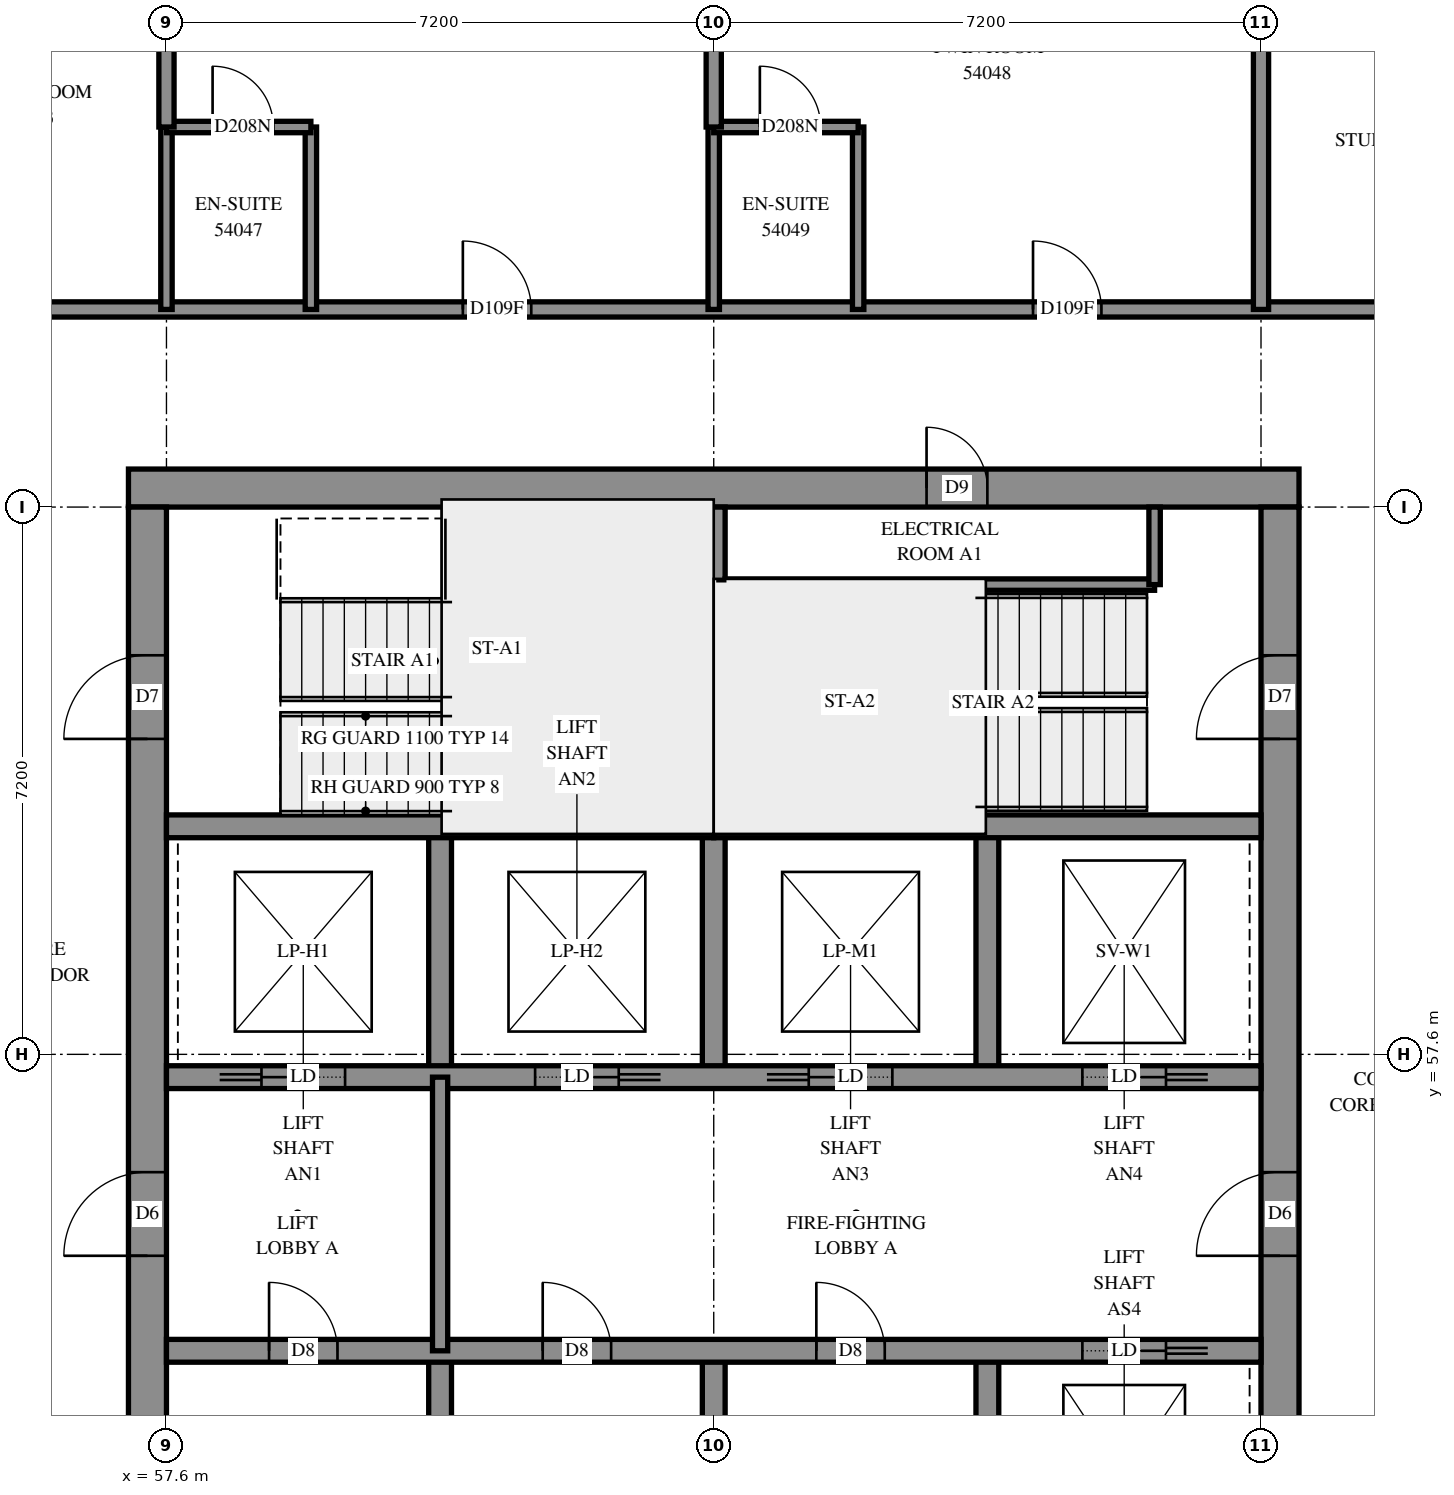
"""IFC4 building model, lengths in metres.
Left out: names, types, materials, properties, quantities, classifications, styles, units other than length and angle.
Written with IfcOpenShell. Run it as: python <this file> out.ifc"""

import sys

from ifc_helpers import new_model, si_unit, direction, frame, frame_2d, origin, place, context, subcontext, project, spatial, rectangle, extrude, element, fill, save


model = new_model("IFC4")
c1 = context("Model", 3, precision=1e-05, world=origin(), true_north=direction((0.0, 1.0)))
c2 = subcontext(c1, "Body", "Model", "MODEL_VIEW")
j1 = project(units=[si_unit("LENGTHUNIT", "METRE"), si_unit("PLANEANGLEUNIT", "RADIAN")], contexts=[c1])
p1 = place(None, origin())
s1 = spatial("IfcSite", under=j1, at=p1, CompositionType="ELEMENT")
p2 = place(p1, origin())
s2 = spatial("IfcBuilding", under=s1, at=p2, CompositionType="ELEMENT")
p3 = place(p2, frame((0.0, 0.0, 199.8)))
s3 = spatial("IfcBuildingStorey", under=s2, at=p3, CompositionType="ELEMENT", Elevation=199.8)
p4 = place(p3, frame((57.1, 65.05, -0.3), z_axis=(0.0, 0.0, 1.0), x_axis=(1.0, 0.0, 0.0)))
e1 = element("IfcWall", 1, at=p4, inside=s3, PredefinedType="SHEAR", context=c2, shape_type="SweptSolid", body=[
    extrude(rectangle(XDim=15.4, YDim=0.5, at=frame_2d((7.7, 0.0))), origin(), (0.0, 0.0, 1.0), 2.7),
])
p5 = place(p4, frame((10.5, 0.0, 0.3)))
e2 = element("IfcOpeningElement", 2, at=p5, cuts=e1, PredefinedType="OPENING", context=c2, shape_type="SweptSolid", body=[
    extrude(rectangle(XDim=0.8, YDim=2.1, at=frame_2d((0.4, 1.05))), frame((0.0, 0.26, 0.0), z_axis=(0.0, -1.0, 0.0), x_axis=(1.0, 0.0, 0.0)), (0.0, 0.0, 1.0), 0.52),
])
p6 = place(p3, frame((57.35, 50.4, -0.3), z_axis=(0.0, 0.0, 1.0), x_axis=(0.0, 1.0, 0.0)))
e3 = element("IfcWall", 3, at=p6, inside=s3, PredefinedType="SHEAR", context=c2, shape_type="SweptSolid", body=[
    extrude(rectangle(XDim=14.4, YDim=0.5, at=frame_2d((7.2, 0.0))), origin(), (0.0, 0.0, 1.0), 2.7),
])
p7 = place(p6, frame((4.55, 0.0, 0.3)))
e4 = element("IfcOpeningElement", 4, at=p7, cuts=e3, PredefinedType="OPENING", context=c2, shape_type="SweptSolid", body=[
    extrude(rectangle(XDim=1.1, YDim=2.1, at=frame_2d((0.55, 1.05))), frame((0.0, 0.26, 0.0), z_axis=(0.0, -1.0, 0.0), x_axis=(1.0, 0.0, 0.0)), (0.0, 0.0, 1.0), 0.52),
])
p8 = place(p6, frame((11.35, 0.0, 0.3)))
e5 = element("IfcOpeningElement", 5, at=p8, cuts=e3, PredefinedType="OPENING", context=c2, shape_type="SweptSolid", body=[
    extrude(rectangle(XDim=1.1, YDim=2.1, at=frame_2d((0.55, 1.05))), frame((0.0, 0.26, 0.0), z_axis=(0.0, -1.0, 0.0), x_axis=(1.0, 0.0, 0.0)), (0.0, 0.0, 1.0), 0.52),
])
p9 = place(p3, frame((72.25, 50.4, -0.3), z_axis=(0.0, 0.0, 1.0), x_axis=(0.0, 1.0, 0.0)))
e6 = element("IfcWall", 6, at=p9, inside=s3, PredefinedType="SHEAR", context=c2, shape_type="SweptSolid", body=[
    extrude(rectangle(XDim=14.4, YDim=0.5, at=frame_2d((7.2, 0.0))), origin(), (0.0, 0.0, 1.0), 2.7),
])
p10 = place(p9, frame((4.55, 0.0, 0.3)))
e7 = element("IfcOpeningElement", 7, at=p10, cuts=e6, PredefinedType="OPENING", context=c2, shape_type="SweptSolid", body=[
    extrude(rectangle(XDim=1.1, YDim=2.1, at=frame_2d((0.55, 1.05))), frame((0.0, 0.26, 0.0), z_axis=(0.0, -1.0, 0.0), x_axis=(1.0, 0.0, 0.0)), (0.0, 0.0, 1.0), 0.52),
])
p11 = place(p9, frame((11.35, 0.0, 0.3)))
e8 = element("IfcOpeningElement", 8, at=p11, cuts=e6, PredefinedType="OPENING", context=c2, shape_type="SweptSolid", body=[
    extrude(rectangle(XDim=1.1, YDim=2.1, at=frame_2d((0.55, 1.05))), frame((0.0, 0.26, 0.0), z_axis=(0.0, -1.0, 0.0), x_axis=(1.0, 0.0, 0.0)), (0.0, 0.0, 1.0), 0.52),
])
for number, where, z_axis, x_axis in (
    (9, (61.2, 50.4, 0.0), (0.0, 0.0, 1.0), (0.0, 1.0, 0.0)),
    (10, (61.2, 57.3, 0.0), (0.0, 0.0, 1.0), (0.0, 1.0, 0.0)),
    (11, (64.8, 50.4, 0.0), (0.0, 0.0, 1.0), (0.0, 1.0, 0.0)),
    (12, (64.8, 57.3, 0.0), (0.0, 0.0, 1.0), (0.0, 1.0, 0.0)),
    (13, (68.4, 50.4, 0.0), (0.0, 0.0, 1.0), (0.0, 1.0, 0.0)),
    (14, (68.4, 57.3, 0.0), (0.0, 0.0, 1.0), (0.0, 1.0, 0.0)),
):
    element("IfcWall", number, at=place(p3, frame(where, z_axis=z_axis, x_axis=x_axis)), inside=s3, PredefinedType="SOLIDWALL", context=c2, shape_type="SweptSolid", body=[
        extrude(rectangle(XDim=3.3, YDim=0.3, at=frame_2d((1.65, 0.0))), origin(), (0.0, 0.0, 1.0), 3.1),
    ])
p12 = place(p3, frame((57.6, 53.7, 0.0), z_axis=(0.0, 0.0, 1.0), x_axis=(1.0, 0.0, 0.0)))
e15 = element("IfcWall", 15, at=p12, inside=s3, PredefinedType="SOLIDWALL", context=c2, shape_type="SweptSolid", body=[
    extrude(rectangle(XDim=14.4, YDim=0.3, at=frame_2d((7.2, 0.0))), origin(), (0.0, 0.0, 1.0), 3.1),
])
p13 = place(p12, frame((1.35, 0.0, 0.0)))
e16 = element("IfcOpeningElement", 16, at=p13, cuts=e15, PredefinedType="OPENING", context=c2, shape_type="SweptSolid", body=[
    extrude(rectangle(XDim=0.9, YDim=2.1, at=frame_2d((0.45, 1.05))), frame((0.0, 0.16, 0.0), z_axis=(0.0, -1.0, 0.0), x_axis=(1.0, 0.0, 0.0)), (0.0, 0.0, 1.0), 0.32),
])
p14 = place(p12, frame((4.95, 0.0, 0.0)))
e17 = element("IfcOpeningElement", 17, at=p14, cuts=e15, PredefinedType="OPENING", context=c2, shape_type="SweptSolid", body=[
    extrude(rectangle(XDim=0.9, YDim=2.1, at=frame_2d((0.45, 1.05))), frame((0.0, 0.16, 0.0), z_axis=(0.0, -1.0, 0.0), x_axis=(1.0, 0.0, 0.0)), (0.0, 0.0, 1.0), 0.32),
])
p15 = place(p12, frame((8.55, 0.0, 0.0)))
e18 = element("IfcOpeningElement", 18, at=p15, cuts=e15, PredefinedType="OPENING", context=c2, shape_type="SweptSolid", body=[
    extrude(rectangle(XDim=0.9, YDim=2.1, at=frame_2d((0.45, 1.05))), frame((0.0, 0.16, 0.0), z_axis=(0.0, -1.0, 0.0), x_axis=(1.0, 0.0, 0.0)), (0.0, 0.0, 1.0), 0.32),
])
p16 = place(p12, frame((12.05, 0.0, 0.0)))
e19 = element("IfcOpeningElement", 19, at=p16, cuts=e15, PredefinedType="OPENING", context=c2, shape_type="SweptSolid", body=[
    extrude(rectangle(XDim=1.1, YDim=2.1, at=frame_2d((0.55, 1.05))), frame((0.0, 0.16, 0.0), z_axis=(0.0, -1.0, 0.0), x_axis=(1.0, 0.0, 0.0)), (0.0, 0.0, 1.0), 0.32),
])
p17 = place(p3, frame((57.6, 57.3, 0.0), z_axis=(0.0, 0.0, 1.0), x_axis=(1.0, 0.0, 0.0)))
e20 = element("IfcWall", 20, at=p17, inside=s3, PredefinedType="SOLIDWALL", context=c2, shape_type="SweptSolid", body=[
    extrude(rectangle(XDim=14.4, YDim=0.3, at=frame_2d((7.2, 0.0))), origin(), (0.0, 0.0, 1.0), 3.1),
])
p18 = place(p17, frame((1.25, 0.0, 0.0)))
e21 = element("IfcOpeningElement", 21, at=p18, cuts=e20, PredefinedType="OPENING", context=c2, shape_type="SweptSolid", body=[
    extrude(rectangle(XDim=1.1, YDim=2.1, at=frame_2d((0.55, 1.05))), frame((0.0, 0.16, 0.0), z_axis=(0.0, -1.0, 0.0), x_axis=(1.0, 0.0, 0.0)), (0.0, 0.0, 1.0), 0.32),
])
p19 = place(p17, frame((4.85, 0.0, 0.0)))
e22 = element("IfcOpeningElement", 22, at=p19, cuts=e20, PredefinedType="OPENING", context=c2, shape_type="SweptSolid", body=[
    extrude(rectangle(XDim=1.1, YDim=2.1, at=frame_2d((0.55, 1.05))), frame((0.0, 0.16, 0.0), z_axis=(0.0, -1.0, 0.0), x_axis=(1.0, 0.0, 0.0)), (0.0, 0.0, 1.0), 0.32),
])
p20 = place(p17, frame((8.45, 0.0, 0.0)))
e23 = element("IfcOpeningElement", 23, at=p20, cuts=e20, PredefinedType="OPENING", context=c2, shape_type="SweptSolid", body=[
    extrude(rectangle(XDim=1.1, YDim=2.1, at=frame_2d((0.55, 1.05))), frame((0.0, 0.16, 0.0), z_axis=(0.0, -1.0, 0.0), x_axis=(1.0, 0.0, 0.0)), (0.0, 0.0, 1.0), 0.32),
])
p21 = place(p17, frame((12.05, 0.0, 0.0)))
e24 = element("IfcOpeningElement", 24, at=p21, cuts=e20, PredefinedType="OPENING", context=c2, shape_type="SweptSolid", body=[
    extrude(rectangle(XDim=1.1, YDim=2.1, at=frame_2d((0.55, 1.05))), frame((0.0, 0.16, 0.0), z_axis=(0.0, -1.0, 0.0), x_axis=(1.0, 0.0, 0.0)), (0.0, 0.0, 1.0), 0.32),
])
for number, where, z_axis, x_axis in (
    (25, (57.6, 60.6, 0.0), (0.0, 0.0, 1.0), (1.0, 0.0, 0.0)),
    (26, (64.8, 60.6, 0.0), (0.0, 0.0, 1.0), (1.0, 0.0, 0.0)),
):
    element("IfcWall", number, at=place(p3, frame(where, z_axis=z_axis, x_axis=x_axis)), inside=s3, PredefinedType="SOLIDWALL", context=c2, shape_type="SweptSolid", body=[
        extrude(rectangle(XDim=7.2, YDim=0.3, at=frame_2d((3.6, 0.0))), origin(), (0.0, 0.0, 1.0), 3.1),
    ])
p22 = place(p3, frame((64.8, 60.6, 0.0), z_axis=(0.0, 0.0, 1.0), x_axis=(0.0, 1.0, 0.0)))
e27 = element("IfcWall", 27, at=p22, inside=s3, PredefinedType="SOLIDWALL", context=c2, shape_type="SweptSolid", body=[
    extrude(rectangle(XDim=4.2, YDim=0.3, at=frame_2d((2.1, 0.0))), origin(), (0.0, 0.0, 1.0), 3.1),
])
p23 = place(p3, frame((64.95, 63.78, 0.0), z_axis=(0.0, 0.0, 1.0), x_axis=(1.0, 0.0, 0.0)))
e28 = element("IfcWall", 28, at=p23, inside=s3, PredefinedType="PARTITIONING", context=c2, shape_type="SweptSolid", body=[
    extrude(rectangle(XDim=5.65, YDim=0.15, at=frame_2d((2.825, 0.0))), origin(), (0.0, 0.0, 1.0), 3.1),
])
p24 = place(p3, frame((70.6, 63.78, 0.0), z_axis=(0.0, 0.0, 1.0), x_axis=(0.0, 1.0, 0.0)))
e29 = element("IfcWall", 29, at=p24, inside=s3, PredefinedType="PARTITIONING", context=c2, shape_type="SweptSolid", body=[
    extrude(rectangle(XDim=1.02, YDim=0.15, at=frame_2d((0.51, 0.0))), origin(), (0.0, 0.0, 1.0), 3.1),
])
p25 = place(p3, frame((61.2, 53.7, 0.0), z_axis=(0.0, 0.0, 1.0), x_axis=(0.0, 1.0, 0.0)))
e30 = element("IfcWall", 30, at=p25, inside=s3, PredefinedType="PARTITIONING", context=c2, shape_type="SweptSolid", body=[
    extrude(rectangle(XDim=3.6, YDim=0.2, at=frame_2d((1.8, 0.0))), origin(), (0.0, 0.0, 1.0), 3.1),
])
p26 = place(p3, frame((55.0, 67.4, 0.0), z_axis=(0.0, 0.0, 1.0), x_axis=(1.0, 0.0, 0.0)))
e31 = element("IfcWall", 31, at=p26, inside=s3, PredefinedType="PARTITIONING", context=c2, shape_type="SweptSolid", body=[
    extrude(rectangle(XDim=19.6, YDim=0.2, at=frame_2d((9.8, 0.0))), origin(), (0.0, 0.0, 1.0), 3.1),
])
p27 = place(p26, frame((6.499, 0.0, 0.0)))
e32 = element("IfcOpeningElement", 32, at=p27, cuts=e31, PredefinedType="OPENING", context=c2, shape_type="SweptSolid", body=[
    extrude(rectangle(XDim=0.9, YDim=2.1, at=frame_2d((0.45, 1.05))), frame((0.0, 0.11, 0.0), z_axis=(0.0, -1.0, 0.0), x_axis=(1.0, 0.0, 0.0)), (0.0, 0.0, 1.0), 0.22),
])
p28 = place(p26, frame((14.001, 0.0, 0.0)))
e33 = element("IfcOpeningElement", 33, at=p28, cuts=e31, PredefinedType="OPENING", context=c2, shape_type="SweptSolid", body=[
    extrude(rectangle(XDim=0.9, YDim=2.1, at=frame_2d((0.45, 1.05))), frame((0.0, 0.11, 0.0), z_axis=(0.0, -1.0, 0.0), x_axis=(1.0, 0.0, 0.0)), (0.0, 0.0, 1.0), 0.22),
])
p29 = place(p3, frame((72.0, 67.4, 0.0), z_axis=(0.0, 0.0, 1.0), x_axis=(0.0, 1.0, 0.0)))
e34 = element("IfcWall", 34, at=p29, inside=s3, PredefinedType="PARTITIONING", context=c2, shape_type="SweptSolid", body=[
    extrude(rectangle(XDim=4.096, YDim=0.2, at=frame_2d((2.048, 0.0))), origin(), (0.0, 0.0, 1.0), 3.1),
])
for number, where, z_axis, x_axis in (
    (35, (59.5, 67.4, 0.0), (0.0, 0.0, 1.0), (0.0, 1.0, 0.0)),
    (36, (57.6, 67.4, 0.0), (0.0, 0.0, 1.0), (0.0, 1.0, 0.0)),
    (37, (66.7, 67.4, 0.0), (0.0, 0.0, 1.0), (0.0, 1.0, 0.0)),
    (38, (64.8, 67.4, 0.0), (0.0, 0.0, 1.0), (0.0, 1.0, 0.0)),
):
    element("IfcWall", number, at=place(p3, frame(where, z_axis=z_axis, x_axis=x_axis)), inside=s3, PredefinedType="PARTITIONING", context=c2, shape_type="SweptSolid", body=[
        extrude(rectangle(XDim=2.4, YDim=0.15, at=frame_2d((1.2, 0.0))), origin(), (0.0, 0.0, 1.0), 3.1),
    ])
p30 = place(p3, frame((64.8, 69.8, 0.0), z_axis=(0.0, 0.0, 1.0), x_axis=(1.0, 0.0, 0.0)))
e39 = element("IfcWall", 39, at=p30, inside=s3, PredefinedType="PARTITIONING", context=c2, shape_type="SweptSolid", body=[
    extrude(rectangle(XDim=1.9, YDim=0.15, at=frame_2d((0.95, 0.0))), origin(), (0.0, 0.0, 1.0), 3.1),
])
p31 = place(p30, frame((0.607, 0.0, 0.0)))
e40 = element("IfcOpeningElement", 40, at=p31, cuts=e39, PredefinedType="OPENING", context=c2, shape_type="SweptSolid", body=[
    extrude(rectangle(XDim=0.8, YDim=2.1, at=frame_2d((0.4, 1.05))), frame((0.0, 0.085, 0.0), z_axis=(0.0, -1.0, 0.0), x_axis=(1.0, 0.0, 0.0)), (0.0, 0.0, 1.0), 0.17),
])
p32 = place(p3, frame((57.6, 69.8, 0.0), z_axis=(0.0, 0.0, 1.0), x_axis=(1.0, 0.0, 0.0)))
e41 = element("IfcWall", 41, at=p32, inside=s3, PredefinedType="PARTITIONING", context=c2, shape_type="SweptSolid", body=[
    extrude(rectangle(XDim=1.9, YDim=0.15, at=frame_2d((0.95, 0.0))), origin(), (0.0, 0.0, 1.0), 3.1),
])
p33 = place(p32, frame((0.607, 0.0, 0.0)))
e42 = element("IfcOpeningElement", 42, at=p33, cuts=e41, PredefinedType="OPENING", context=c2, shape_type="SweptSolid", body=[
    extrude(rectangle(XDim=0.8, YDim=2.1, at=frame_2d((0.4, 1.05))), frame((0.0, 0.085, 0.0), z_axis=(0.0, -1.0, 0.0), x_axis=(1.0, 0.0, 0.0)), (0.0, 0.0, 1.0), 0.17),
])
for number, where, z_axis, x_axis in (
    (43, (57.6, 69.8, 0.0), (0.0, 0.0, 1.0), (0.0, 1.0, 0.0)),
    (44, (64.8, 69.8, 0.0), (0.0, 0.0, 1.0), (0.0, 1.0, 0.0)),
):
    element("IfcWall", number, at=place(p3, frame(where, z_axis=z_axis, x_axis=x_axis)), inside=s3, PredefinedType="PARTITIONING", context=c2, shape_type="SweptSolid", body=[
        extrude(rectangle(XDim=1.8, YDim=0.2, at=frame_2d((0.9, 0.0))), origin(), (0.0, 0.0, 1.0), 3.1),
    ])
p34 = place(p5, origin())
e45 = element("IfcDoor", 45, at=p34, inside=s3, OperationType="SINGLE_SWING_RIGHT", PredefinedType="DOOR", context=c2, shape_type="SweptSolid", body=[
    extrude(rectangle(XDim=0.8, YDim=2.1, at=frame_2d((0.4, 1.05))), frame((0.0, 0.025, 0.0), z_axis=(0.0, -1.0, 0.0), x_axis=(1.0, 0.0, 0.0)), (0.0, 0.0, 1.0), 0.05),
])
fill(e2, e45)
p35 = place(p7, origin())
e46 = element("IfcDoor", 46, at=p35, inside=s3, OperationType="DOUBLE_DOOR_SINGLE_SWING", PredefinedType="DOOR", context=c2, shape_type="SweptSolid", body=[
    extrude(rectangle(XDim=1.1, YDim=2.1, at=frame_2d((0.55, 1.05))), frame((0.0, 0.025, 0.0), z_axis=(0.0, -1.0, 0.0), x_axis=(1.0, 0.0, 0.0)), (0.0, 0.0, 1.0), 0.05),
])
fill(e4, e46)
p36 = place(p10, origin())
e47 = element("IfcDoor", 47, at=p36, inside=s3, OperationType="DOUBLE_DOOR_SINGLE_SWING", PredefinedType="DOOR", context=c2, shape_type="SweptSolid", body=[
    extrude(rectangle(XDim=1.1, YDim=2.1, at=frame_2d((0.55, 1.05))), frame((0.0, 0.025, 0.0), z_axis=(0.0, -1.0, 0.0), x_axis=(1.0, 0.0, 0.0)), (0.0, 0.0, 1.0), 0.05),
])
fill(e7, e47)
p37 = place(p8, origin())
e48 = element("IfcDoor", 48, at=p37, inside=s3, OperationType="SINGLE_SWING_LEFT", PredefinedType="DOOR", context=c2, shape_type="SweptSolid", body=[
    extrude(rectangle(XDim=1.1, YDim=2.1, at=frame_2d((0.55, 1.05))), frame((0.0, 0.025, 0.0), z_axis=(0.0, -1.0, 0.0), x_axis=(1.0, 0.0, 0.0)), (0.0, 0.0, 1.0), 0.05),
])
fill(e5, e48)
p38 = place(p11, origin())
e49 = element("IfcDoor", 49, at=p38, inside=s3, OperationType="SINGLE_SWING_RIGHT", PredefinedType="DOOR", context=c2, shape_type="SweptSolid", body=[
    extrude(rectangle(XDim=1.1, YDim=2.1, at=frame_2d((0.55, 1.05))), frame((0.0, 0.025, 0.0), z_axis=(0.0, -1.0, 0.0), x_axis=(1.0, 0.0, 0.0)), (0.0, 0.0, 1.0), 0.05),
])
fill(e8, e49)
p39 = place(p13, origin())
e50 = element("IfcDoor", 50, at=p39, inside=s3, OperationType="SINGLE_SWING_LEFT", PredefinedType="DOOR", context=c2, shape_type="SweptSolid", body=[
    extrude(rectangle(XDim=0.9, YDim=2.1, at=frame_2d((0.45, 1.05))), frame((0.0, 0.025, 0.0), z_axis=(0.0, -1.0, 0.0), x_axis=(1.0, 0.0, 0.0)), (0.0, 0.0, 1.0), 0.05),
])
fill(e16, e50)
p40 = place(p14, origin())
e51 = element("IfcDoor", 51, at=p40, inside=s3, OperationType="SINGLE_SWING_LEFT", PredefinedType="DOOR", context=c2, shape_type="SweptSolid", body=[
    extrude(rectangle(XDim=0.9, YDim=2.1, at=frame_2d((0.45, 1.05))), frame((0.0, 0.025, 0.0), z_axis=(0.0, -1.0, 0.0), x_axis=(1.0, 0.0, 0.0)), (0.0, 0.0, 1.0), 0.05),
])
fill(e17, e51)
p41 = place(p15, origin())
e52 = element("IfcDoor", 52, at=p41, inside=s3, OperationType="SINGLE_SWING_LEFT", PredefinedType="DOOR", context=c2, shape_type="SweptSolid", body=[
    extrude(rectangle(XDim=0.9, YDim=2.1, at=frame_2d((0.45, 1.05))), frame((0.0, 0.025, 0.0), z_axis=(0.0, -1.0, 0.0), x_axis=(1.0, 0.0, 0.0)), (0.0, 0.0, 1.0), 0.05),
])
fill(e18, e52)
p42 = place(p16, origin())
e53 = element("IfcDoor", 53, at=p42, inside=s3, OperationType="SLIDING_TO_RIGHT", PredefinedType="DOOR", context=c2, shape_type="SweptSolid", body=[
    extrude(rectangle(XDim=1.1, YDim=2.1, at=frame_2d((0.55, 1.05))), frame((0.0, 0.025, 0.0), z_axis=(0.0, -1.0, 0.0), x_axis=(1.0, 0.0, 0.0)), (0.0, 0.0, 1.0), 0.05),
])
fill(e19, e53)
p43 = place(p18, origin())
e54 = element("IfcDoor", 54, at=p43, inside=s3, OperationType="SLIDING_TO_LEFT", PredefinedType="DOOR", context=c2, shape_type="SweptSolid", body=[
    extrude(rectangle(XDim=1.1, YDim=2.1, at=frame_2d((0.55, 1.05))), frame((0.0, 0.025, 0.0), z_axis=(0.0, -1.0, 0.0), x_axis=(1.0, 0.0, 0.0)), (0.0, 0.0, 1.0), 0.05),
])
fill(e21, e54)
p44 = place(p19, origin())
e55 = element("IfcDoor", 55, at=p44, inside=s3, OperationType="SLIDING_TO_RIGHT", PredefinedType="DOOR", context=c2, shape_type="SweptSolid", body=[
    extrude(rectangle(XDim=1.1, YDim=2.1, at=frame_2d((0.55, 1.05))), frame((0.0, 0.025, 0.0), z_axis=(0.0, -1.0, 0.0), x_axis=(1.0, 0.0, 0.0)), (0.0, 0.0, 1.0), 0.05),
])
fill(e22, e55)
p45 = place(p20, origin())
e56 = element("IfcDoor", 56, at=p45, inside=s3, OperationType="SLIDING_TO_LEFT", PredefinedType="DOOR", context=c2, shape_type="SweptSolid", body=[
    extrude(rectangle(XDim=1.1, YDim=2.1, at=frame_2d((0.55, 1.05))), frame((0.0, 0.025, 0.0), z_axis=(0.0, -1.0, 0.0), x_axis=(1.0, 0.0, 0.0)), (0.0, 0.0, 1.0), 0.05),
])
fill(e23, e56)
p46 = place(p21, origin())
e57 = element("IfcDoor", 57, at=p46, inside=s3, OperationType="SLIDING_TO_RIGHT", PredefinedType="DOOR", context=c2, shape_type="SweptSolid", body=[
    extrude(rectangle(XDim=1.1, YDim=2.1, at=frame_2d((0.55, 1.05))), frame((0.0, 0.025, 0.0), z_axis=(0.0, -1.0, 0.0), x_axis=(1.0, 0.0, 0.0)), (0.0, 0.0, 1.0), 0.05),
])
fill(e24, e57)
p47 = place(p27, origin())
e58 = element("IfcDoor", 58, at=p47, inside=s3, OperationType="SINGLE_SWING_RIGHT", PredefinedType="DOOR", context=c2, shape_type="SweptSolid", body=[
    extrude(rectangle(XDim=0.9, YDim=2.1, at=frame_2d((0.45, 1.05))), frame((0.0, 0.025, 0.0), z_axis=(0.0, -1.0, 0.0), x_axis=(1.0, 0.0, 0.0)), (0.0, 0.0, 1.0), 0.05),
])
fill(e32, e58)
p48 = place(p33, origin())
e59 = element("IfcDoor", 59, at=p48, inside=s3, OperationType="SINGLE_SWING_RIGHT", PredefinedType="DOOR", context=c2, shape_type="SweptSolid", body=[
    extrude(rectangle(XDim=0.8, YDim=2.1, at=frame_2d((0.4, 1.05))), frame((0.0, 0.025, 0.0), z_axis=(0.0, -1.0, 0.0), x_axis=(1.0, 0.0, 0.0)), (0.0, 0.0, 1.0), 0.05),
])
fill(e42, e59)
p49 = place(p28, origin())
e60 = element("IfcDoor", 60, at=p49, inside=s3, OperationType="SINGLE_SWING_RIGHT", PredefinedType="DOOR", context=c2, shape_type="SweptSolid", body=[
    extrude(rectangle(XDim=0.9, YDim=2.1, at=frame_2d((0.45, 1.05))), frame((0.0, 0.025, 0.0), z_axis=(0.0, -1.0, 0.0), x_axis=(1.0, 0.0, 0.0)), (0.0, 0.0, 1.0), 0.05),
])
fill(e33, e60)
p50 = place(p31, origin())
e61 = element("IfcDoor", 61, at=p50, inside=s3, OperationType="SINGLE_SWING_RIGHT", PredefinedType="DOOR", context=c2, shape_type="SweptSolid", body=[
    extrude(rectangle(XDim=0.8, YDim=2.1, at=frame_2d((0.4, 1.05))), frame((0.0, 0.025, 0.0), z_axis=(0.0, -1.0, 0.0), x_axis=(1.0, 0.0, 0.0)), (0.0, 0.0, 1.0), 0.05),
])
fill(e40, e61)
save(model, sys.argv[1])
